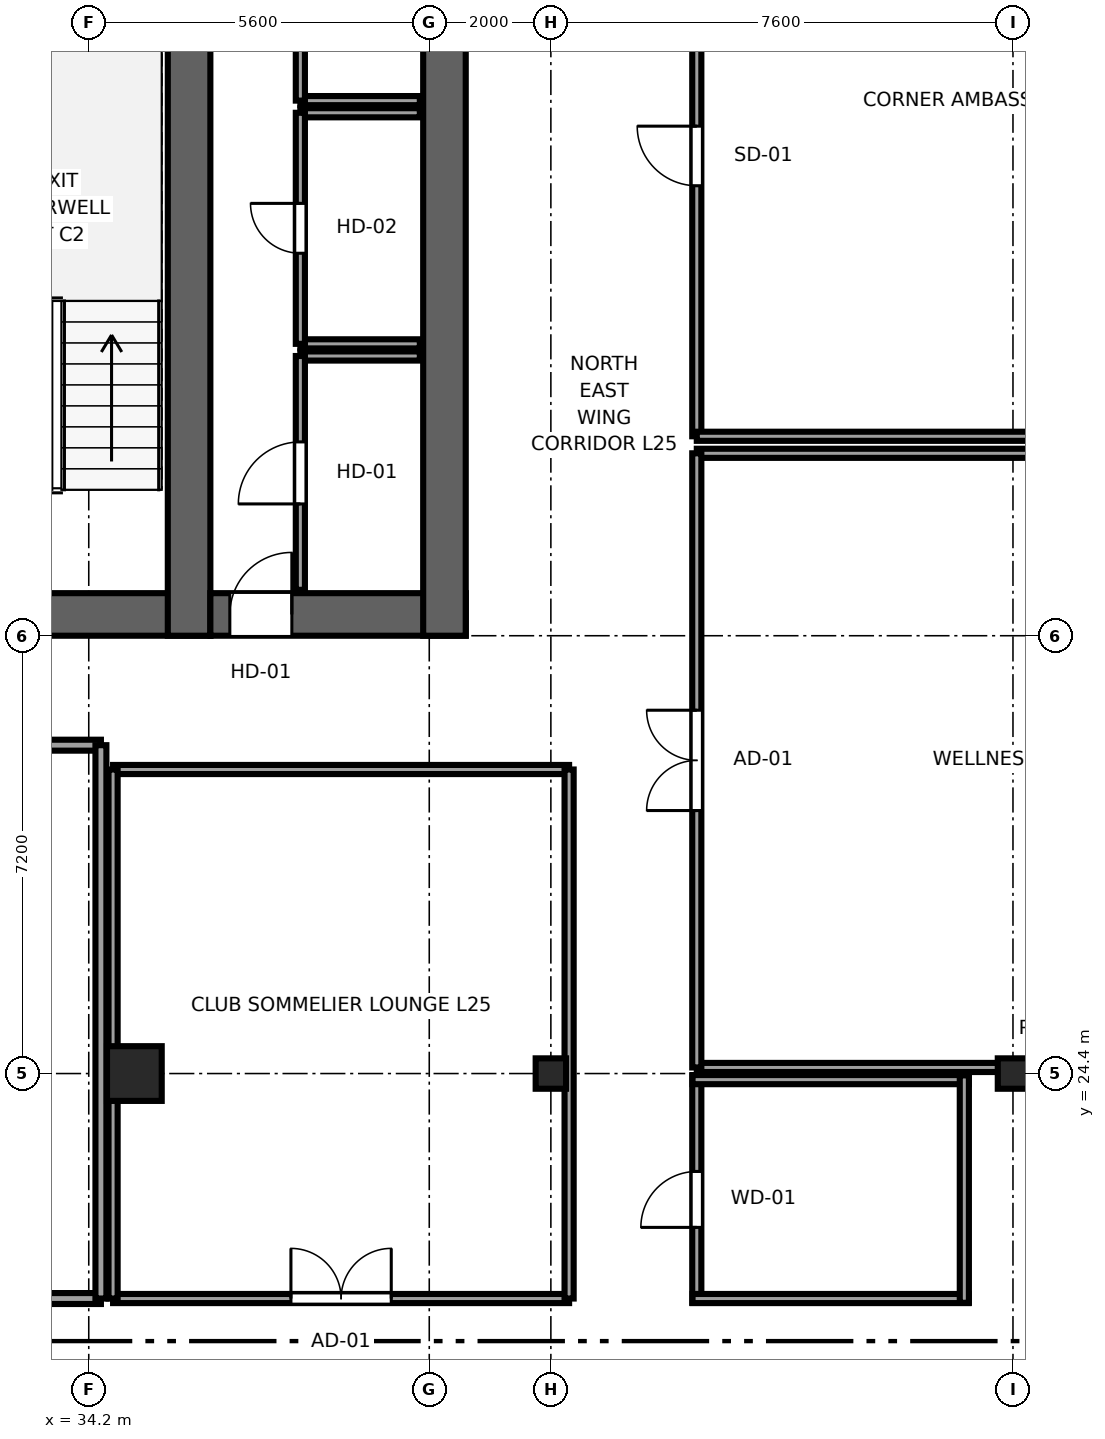
"""IFC4 building model, lengths in metres.
Left out: names, types, materials, properties, quantities, classifications, styles, units other than length and angle.
Written with IfcOpenShell. Run it as: python <this file> out.ifc"""

import sys

from ifc_helpers import new_model, si_unit, direction, frame, frame_2d, origin, origin_2d, place, context, subcontext, project, spatial, rectangle, i_section, extrude, source, transform, mapped, element, fill, save


model = new_model("IFC4")
c1 = context("Model", 3, precision=1e-05, world=origin(), true_north=direction((0.0, 1.0)))
c2 = subcontext(c1, "Body", "Model", "MODEL_VIEW")
j1 = project(units=[si_unit("LENGTHUNIT", "METRE"), si_unit("PLANEANGLEUNIT", "RADIAN")], contexts=[c1])
p1 = place(None, origin())
s1 = spatial("IfcSite", under=j1, at=p1, CompositionType="ELEMENT")
p2 = place(p1, origin())
s2 = spatial("IfcBuilding", under=s1, at=p2, CompositionType="ELEMENT")
p3 = place(p2, frame((0.0, 0.0, 100.9)))
s3 = spatial("IfcBuildingStorey", under=s2, at=p3, CompositionType="ELEMENT", Elevation=100.9)
p4 = place(p3, frame((9.8, 31.95, 0.0), z_axis=(0.0, 0.0, 1.0), x_axis=(1.0, 0.0, 0.0)))
e1 = element("IfcWall", 1, at=p4, inside=s3, PredefinedType="SHEAR", context=c2, shape_type="SweptSolid", body=[
    extrude(rectangle(XDim=26.4, YDim=0.7, at=frame_2d((13.2, 0.0))), origin(), (0.0, 0.0, 1.0), 3.55),
])
p5 = place(p4, frame((6.32, 0.0, 0.0), z_axis=(0.0, 0.0, 1.0), x_axis=(-1.0, 0.0, 0.0)))
e2 = element("IfcOpeningElement", 2, at=p5, cuts=e1, PredefinedType="OPENING", context=c2, shape_type="SweptSolid", body=[
    extrude(rectangle(XDim=1.5, YDim=2.04, at=frame_2d((0.75, 1.02))), frame((0.0, 0.36, 0.0), z_axis=(0.0, -1.0, 0.0), x_axis=(1.0, 0.0, 0.0)), (0.0, 0.0, 1.0), 0.72),
])
p6 = place(p4, frame((13.95, 0.0, 0.0), z_axis=(0.0, 0.0, 1.0), x_axis=(-1.0, 0.0, 0.0)))
e3 = element("IfcOpeningElement", 3, at=p6, cuts=e1, PredefinedType="OPENING", context=c2, shape_type="SweptSolid", body=[
    extrude(rectangle(XDim=1.5, YDim=2.04, at=frame_2d((0.75, 1.02))), frame((0.0, 0.36, 0.0), z_axis=(0.0, -1.0, 0.0), x_axis=(1.0, 0.0, 0.0)), (0.0, 0.0, 1.0), 0.72),
])
p7 = place(p4, frame((20.25, 0.0, 0.0), z_axis=(0.0, 0.0, 1.0), x_axis=(-1.0, 0.0, 0.0)))
e4 = element("IfcOpeningElement", 4, at=p7, cuts=e1, PredefinedType="OPENING", context=c2, shape_type="SweptSolid", body=[
    extrude(rectangle(XDim=1.5, YDim=2.04, at=frame_2d((0.75, 1.02))), frame((0.0, 0.36, 0.0), z_axis=(0.0, -1.0, 0.0), x_axis=(1.0, 0.0, 0.0)), (0.0, 0.0, 1.0), 0.72),
])
p8 = place(p4, frame((8.37, 0.0, 0.0), z_axis=(0.0, 0.0, 1.0), x_axis=(-1.0, 0.0, 0.0)))
e5 = element("IfcOpeningElement", 5, at=p8, cuts=e1, PredefinedType="OPENING", context=c2, shape_type="SweptSolid", body=[
    extrude(rectangle(XDim=0.82, YDim=2.01, at=frame_2d((0.41, 1.005))), frame((0.0, 0.36, 0.0), z_axis=(0.0, -1.0, 0.0), x_axis=(1.0, 0.0, 0.0)), (0.0, 0.0, 1.0), 0.72),
])
p9 = place(p3, frame((35.85, 31.6, 0.0), z_axis=(0.0, 0.0, 1.0), x_axis=(0.0, 1.0, 0.0)))
e6 = element("IfcWall", 6, at=p9, inside=s3, PredefinedType="SHEAR", context=c2, shape_type="SweptSolid", body=[
    extrude(rectangle(XDim=13.6, YDim=0.7, at=frame_2d((6.8, 0.0))), origin(), (0.0, 0.0, 1.0), 3.55),
])
p10 = place(p3, frame((36.2, 31.95, 0.0), z_axis=(0.0, 0.0, 1.0), x_axis=(1.0, 0.0, 0.0)))
e7 = element("IfcWall", 7, at=p10, inside=s3, PredefinedType="SHEAR", context=c2, shape_type="SweptSolid", body=[
    extrude(rectangle(XDim=4.2, YDim=0.7, at=frame_2d((2.1, 0.0))), origin(), (0.0, 0.0, 1.0), 3.55),
])
p11 = place(p10, frame((1.34, 0.0, 0.0), z_axis=(0.0, 0.0, 1.0), x_axis=(-1.0, 0.0, 0.0)))
e8 = element("IfcOpeningElement", 8, at=p11, cuts=e7, PredefinedType="OPENING", context=c2, shape_type="SweptSolid", body=[
    extrude(rectangle(XDim=1.02, YDim=2.03, at=frame_2d((0.51, 1.015))), frame((0.0, 0.36, 0.0), z_axis=(0.0, -1.0, 0.0), x_axis=(1.0, 0.0, 0.0)), (0.0, 0.0, 1.0), 0.72),
])
p12 = place(p3, frame((40.05, 31.6, 0.0), z_axis=(0.0, 0.0, 1.0), x_axis=(0.0, 1.0, 0.0)))
e9 = element("IfcWall", 9, at=p12, inside=s3, PredefinedType="SHEAR", context=c2, shape_type="SweptSolid", body=[
    extrude(rectangle(XDim=13.6, YDim=0.7, at=frame_2d((6.8, 0.0))), origin(), (0.0, 0.0, 1.0), 3.55),
])
m1 = source(origin(), c2, "Body", "SweptSolid", [
    extrude(rectangle(XDim=0.9, YDim=0.9, at=origin_2d()), origin(), (0.0, 0.0, 1.0), 3.55),
])
p13 = place(p3, frame((34.95, 24.4, 0.0), z_axis=(0.0, 0.0, 1.0), x_axis=(1.0, 0.0, 0.0)))
e10 = element("IfcColumn", 10, at=p13, inside=s3, PredefinedType="COLUMN", context=c2, shape_type="MappedRepresentation", body=[
    mapped(m1, transform((0.0, 0.0, 0.0), x_axis=(1.0, 0.0, 0.0), y_axis=(0.0, 1.0, 0.0), z_axis=(0.0, 0.0, 1.0), scale=1.0)),
])
m2 = source(origin(), c2, "Body", "SweptSolid", [
    extrude(i_section(OverallWidth=0.5, OverallDepth=0.5, WebThickness=0.022, FlangeThickness=0.034, at=origin_2d()), origin(), (0.0, 0.0, 1.0), 3.55),
])
for number, where, z_axis, x_axis in (
    (11, (41.8, 24.4, 0.0), (0.0, 0.0, 1.0), (1.0, 0.0, 0.0)),
    (12, (49.4, 24.4, 0.0), (0.0, 0.0, 1.0), (1.0, 0.0, 0.0)),
):
    element("IfcColumn", number, at=place(p3, frame(where, z_axis=z_axis, x_axis=x_axis)), inside=s3, PredefinedType="COLUMN", context=c2, shape_type="MappedRepresentation", body=[
        mapped(m2, transform((0.0, 0.0, 0.0), x_axis=(1.0, 0.0, 0.0), y_axis=(0.0, 1.0, 0.0), z_axis=(0.0, 0.0, 1.0), scale=1.0)),
    ])
p14 = place(p3, frame((37.68, 36.2, 0.0), z_axis=(0.0, 0.0, 1.0), x_axis=(1.0, 0.0, 0.0)))
e13 = element("IfcWall", 13, at=p14, inside=s3, PredefinedType="PARTITIONING", context=c2, shape_type="SweptSolid", body=[
    extrude(rectangle(XDim=1.965, YDim=0.15, at=frame_2d((0.982, 0.0))), origin(), (0.0, 0.0, 1.0), 3.37),
])
p15 = place(p3, frame((37.68, 32.355, 0.0), z_axis=(0.0, 0.0, 1.0), x_axis=(0.0, 1.0, 0.0)))
e14 = element("IfcWall", 14, at=p15, inside=s3, PredefinedType="PARTITIONING", context=c2, shape_type="SweptSolid", body=[
    extrude(rectangle(XDim=3.845, YDim=0.15, at=frame_2d((1.922, 0.0))), origin(), (0.0, 0.0, 1.0), 3.37),
])
p16 = place(p15, frame((1.413, 0.0, 0.0)))
e15 = element("IfcOpeningElement", 15, at=p16, cuts=e14, PredefinedType="OPENING", context=c2, shape_type="SweptSolid", body=[
    extrude(rectangle(XDim=1.02, YDim=2.03, at=frame_2d((0.51, 1.015))), frame((0.0, 0.085, 0.0), z_axis=(0.0, -1.0, 0.0), x_axis=(1.0, 0.0, 0.0)), (0.0, 0.0, 1.0), 0.17),
])
for number, where, z_axis, x_axis in (
    (16, (37.68, 36.4, 0.0), (0.0, 0.0, 1.0), (1.0, 0.0, 0.0)),
    (17, (37.68, 40.2, 0.0), (0.0, 0.0, 1.0), (1.0, 0.0, 0.0)),
):
    element("IfcWall", number, at=place(p3, frame(where, z_axis=z_axis, x_axis=x_axis)), inside=s3, PredefinedType="PARTITIONING", context=c2, shape_type="SweptSolid", body=[
        extrude(rectangle(XDim=1.965, YDim=0.15, at=frame_2d((0.982, 0.0))), origin(), (0.0, 0.0, 1.0), 3.37),
    ])
p17 = place(p3, frame((37.68, 36.4, 0.0), z_axis=(0.0, 0.0, 1.0), x_axis=(0.0, 1.0, 0.0)))
e18 = element("IfcWall", 18, at=p17, inside=s3, PredefinedType="PARTITIONING", context=c2, shape_type="SweptSolid", body=[
    extrude(rectangle(XDim=3.8, YDim=0.15, at=frame_2d((1.9, 0.0))), origin(), (0.0, 0.0, 1.0), 3.37),
])
p18 = place(p17, frame((1.49, 0.0, 0.0)))
e19 = element("IfcOpeningElement", 19, at=p18, cuts=e18, PredefinedType="OPENING", context=c2, shape_type="SweptSolid", body=[
    extrude(rectangle(XDim=0.82, YDim=2.01, at=frame_2d((0.41, 1.005))), frame((0.0, 0.085, 0.0), z_axis=(0.0, -1.0, 0.0), x_axis=(1.0, 0.0, 0.0)), (0.0, 0.0, 1.0), 0.17),
])
p19 = place(p3, frame((37.68, 40.4, 0.0), z_axis=(0.0, 0.0, 1.0), x_axis=(1.0, 0.0, 0.0)))
e20 = element("IfcWall", 20, at=p19, inside=s3, PredefinedType="PARTITIONING", context=c2, shape_type="SweptSolid", body=[
    extrude(rectangle(XDim=1.965, YDim=0.15, at=frame_2d((0.982, 0.0))), origin(), (0.0, 0.0, 1.0), 3.37),
])
p20 = place(p3, frame((37.68, 40.4, 0.0), z_axis=(0.0, 0.0, 1.0), x_axis=(0.0, 1.0, 0.0)))
e21 = element("IfcWall", 21, at=p20, inside=s3, PredefinedType="PARTITIONING", context=c2, shape_type="SweptSolid", body=[
    extrude(rectangle(XDim=3.8, YDim=0.15, at=frame_2d((1.9, 0.0))), origin(), (0.0, 0.0, 1.0), 3.37),
])
p21 = place(p20, frame((1.49, 0.0, 0.0)))
e22 = element("IfcOpeningElement", 22, at=p21, cuts=e21, PredefinedType="OPENING", context=c2, shape_type="SweptSolid", body=[
    extrude(rectangle(XDim=0.82, YDim=2.01, at=frame_2d((0.41, 1.005))), frame((0.0, 0.085, 0.0), z_axis=(0.0, -1.0, 0.0), x_axis=(1.0, 0.0, 0.0)), (0.0, 0.0, 1.0), 0.17),
])
p22 = place(p3, frame((44.2, 20.63, 0.0), z_axis=(0.0, 0.0, 1.0), x_axis=(0.0, 1.0, 0.0)))
e23 = element("IfcWall", 23, at=p22, inside=s3, PredefinedType="PARTITIONING", context=c2, shape_type="SweptSolid", body=[
    extrude(rectangle(XDim=3.74, YDim=0.15, at=frame_2d((1.87, 0.0))), origin(), (0.0, 0.0, 1.0), 3.37),
])
p23 = place(p22, frame((1.24, 0.0, 0.0)))
e24 = element("IfcOpeningElement", 24, at=p23, cuts=e23, PredefinedType="OPENING", context=c2, shape_type="SweptSolid", body=[
    extrude(rectangle(XDim=0.92, YDim=2.01, at=frame_2d((0.46, 1.005))), frame((0.0, 0.085, 0.0), z_axis=(0.0, -1.0, 0.0), x_axis=(1.0, 0.0, 0.0)), (0.0, 0.0, 1.0), 0.17),
])
p24 = place(p3, frame((44.13, 20.7, 0.0), z_axis=(0.0, 0.0, 1.0), x_axis=(1.0, 0.0, 0.0)))
e25 = element("IfcWall", 25, at=p24, inside=s3, PredefinedType="PARTITIONING", context=c2, shape_type="SweptSolid", body=[
    extrude(rectangle(XDim=4.54, YDim=0.15, at=frame_2d((2.27, 0.0))), origin(), (0.0, 0.0, 1.0), 3.37),
])
p25 = place(p3, frame((44.13, 24.3, 0.0), z_axis=(0.0, 0.0, 1.0), x_axis=(1.0, 0.0, 0.0)))
e26 = element("IfcWall", 26, at=p25, inside=s3, PredefinedType="PARTITIONING", context=c2, shape_type="SweptSolid", body=[
    extrude(rectangle(XDim=4.54, YDim=0.15, at=frame_2d((2.27, 0.0))), origin(), (0.0, 0.0, 1.0), 2.748),
])
p26 = place(p3, frame((48.6, 20.63, 0.0), z_axis=(0.0, 0.0, 1.0), x_axis=(0.0, 1.0, 0.0)))
e27 = element("IfcWall", 27, at=p26, inside=s3, PredefinedType="PARTITIONING", context=c2, shape_type="SweptSolid", body=[
    extrude(rectangle(XDim=3.74, YDim=0.15, at=frame_2d((1.87, 0.0))), origin(), (0.0, 0.0, 1.0), 3.37),
])
p27 = place(p3, frame((44.2, 24.5, 0.0), z_axis=(0.0, 0.0, 1.0), x_axis=(1.0, 0.0, 0.0)))
e28 = element("IfcWall", 28, at=p27, inside=s3, PredefinedType="PARTITIONING", context=c2, shape_type="SweptSolid", body=[
    extrude(rectangle(XDim=12.395, YDim=0.15, at=frame_2d((6.198, 0.0))), origin(), (0.0, 0.0, 1.0), 2.748),
])
p28 = place(p3, frame((44.2, 34.6, 0.0), z_axis=(0.0, 0.0, 1.0), x_axis=(1.0, 0.0, 0.0)))
e29 = element("IfcWall", 29, at=p28, inside=s3, PredefinedType="PARTITIONING", context=c2, shape_type="SweptSolid", body=[
    extrude(rectangle(XDim=12.395, YDim=0.15, at=frame_2d((6.198, 0.0))), origin(), (0.0, 0.0, 1.0), 3.37),
])
p29 = place(p3, frame((44.2, 24.5, 0.0), z_axis=(0.0, 0.0, 1.0), x_axis=(0.0, 1.0, 0.0)))
e30 = element("IfcWall", 30, at=p29, inside=s3, PredefinedType="PARTITIONING", context=c2, shape_type="SweptSolid", body=[
    extrude(rectangle(XDim=10.1, YDim=0.15, at=frame_2d((5.05, 0.0))), origin(), (0.0, 0.0, 1.0), 3.37),
])
p30 = place(p29, frame((4.225, 0.0, 0.0)))
e31 = element("IfcOpeningElement", 31, at=p30, cuts=e30, PredefinedType="OPENING", context=c2, shape_type="SweptSolid", body=[
    extrude(rectangle(XDim=1.65, YDim=2.15, at=frame_2d((0.825, 1.075))), frame((0.0, 0.085, 0.0), z_axis=(0.0, -1.0, 0.0), x_axis=(1.0, 0.0, 0.0)), (0.0, 0.0, 1.0), 0.17),
])
p31 = place(p3, frame((44.2, 34.88, 0.0), z_axis=(0.0, 0.0, 1.0), x_axis=(0.0, 1.0, 0.0)))
e32 = element("IfcWall", 32, at=p31, inside=s3, PredefinedType="PARTITIONING", context=c2, shape_type="SweptSolid", body=[
    extrude(rectangle(XDim=9.33, YDim=0.15, at=frame_2d((4.665, 0.0))), origin(), (0.0, 0.0, 1.0), 3.37),
])
p32 = place(p31, frame((4.12, 0.0, 0.0)))
e33 = element("IfcOpeningElement", 33, at=p32, cuts=e32, PredefinedType="OPENING", context=c2, shape_type="SweptSolid", body=[
    extrude(rectangle(XDim=0.98, YDim=2.12, at=frame_2d((0.49, 1.06))), frame((0.0, 0.085, 0.0), z_axis=(0.0, -1.0, 0.0), x_axis=(1.0, 0.0, 0.0)), (0.0, 0.0, 1.0), 0.17),
])
p33 = place(p3, frame((44.2, 34.88, 0.0), z_axis=(0.0, 0.0, 1.0), x_axis=(1.0, 0.0, 0.0)))
e34 = element("IfcWall", 34, at=p33, inside=s3, PredefinedType="PARTITIONING", context=c2, shape_type="SweptSolid", body=[
    extrude(rectangle(XDim=10.03, YDim=0.15, at=frame_2d((5.015, 0.0))), origin(), (0.0, 0.0, 1.0), 3.37),
])
p34 = place(p3, frame((27.1, 20.7, 0.0), z_axis=(0.0, 0.0, 1.0), x_axis=(1.0, 0.0, 0.0)))
e35 = element("IfcWall", 35, at=p34, inside=s3, PredefinedType="PARTITIONING", context=c2, shape_type="SweptSolid", body=[
    extrude(rectangle(XDim=7.3, YDim=0.18, at=frame_2d((3.65, 0.0))), origin(), (0.0, 0.0, 1.0), 3.37),
])
p35 = place(p34, frame((2.825, 0.0, 0.0)))
e36 = element("IfcOpeningElement", 36, at=p35, cuts=e35, PredefinedType="OPENING", context=c2, shape_type="SweptSolid", body=[
    extrude(rectangle(XDim=1.65, YDim=2.15, at=frame_2d((0.825, 1.075))), frame((0.0, 0.1, 0.0), z_axis=(0.0, -1.0, 0.0), x_axis=(1.0, 0.0, 0.0)), (0.0, 0.0, 1.0), 0.2),
])
p36 = place(p3, frame((27.1, 29.8, 0.0), z_axis=(0.0, 0.0, 1.0), x_axis=(1.0, 0.0, 0.0)))
e37 = element("IfcWall", 37, at=p36, inside=s3, PredefinedType="PARTITIONING", context=c2, shape_type="SweptSolid", body=[
    extrude(rectangle(XDim=7.3, YDim=0.18, at=frame_2d((3.65, 0.0))), origin(), (0.0, 0.0, 1.0), 3.37),
])
p37 = place(p3, frame((34.4, 20.7, 0.0), z_axis=(0.0, 0.0, 1.0), x_axis=(0.0, 1.0, 0.0)))
e38 = element("IfcWall", 38, at=p37, inside=s3, PredefinedType="PARTITIONING", context=c2, shape_type="SweptSolid", body=[
    extrude(rectangle(XDim=9.1, YDim=0.18, at=frame_2d((4.55, 0.0))), origin(), (0.0, 0.0, 1.0), 3.37),
])
p38 = place(p3, frame((34.6, 20.7, 0.0), z_axis=(0.0, 0.0, 1.0), x_axis=(1.0, 0.0, 0.0)))
e39 = element("IfcWall", 39, at=p38, inside=s3, PredefinedType="PARTITIONING", context=c2, shape_type="SweptSolid", body=[
    extrude(rectangle(XDim=7.5, YDim=0.15, at=frame_2d((3.75, 0.0))), origin(), (0.0, 0.0, 1.0), 3.37),
])
p39 = place(p38, frame((2.925, 0.0, 0.0)))
e40 = element("IfcOpeningElement", 40, at=p39, cuts=e39, PredefinedType="OPENING", context=c2, shape_type="SweptSolid", body=[
    extrude(rectangle(XDim=1.65, YDim=2.15, at=frame_2d((0.825, 1.075))), frame((0.0, 0.085, 0.0), z_axis=(0.0, -1.0, 0.0), x_axis=(1.0, 0.0, 0.0)), (0.0, 0.0, 1.0), 0.17),
])
p40 = place(p3, frame((34.6, 29.4, 0.0), z_axis=(0.0, 0.0, 1.0), x_axis=(1.0, 0.0, 0.0)))
e41 = element("IfcWall", 41, at=p40, inside=s3, PredefinedType="PARTITIONING", context=c2, shape_type="SweptSolid", body=[
    extrude(rectangle(XDim=7.5, YDim=0.15, at=frame_2d((3.75, 0.0))), origin(), (0.0, 0.0, 1.0), 3.37),
])
p41 = place(p3, frame((34.6, 20.7, 0.0), z_axis=(0.0, 0.0, 1.0), x_axis=(0.0, 1.0, 0.0)))
e42 = element("IfcWall", 42, at=p41, inside=s3, PredefinedType="PARTITIONING", context=c2, shape_type="SweptSolid", body=[
    extrude(rectangle(XDim=8.7, YDim=0.15, at=frame_2d((4.35, 0.0))), origin(), (0.0, 0.0, 1.0), 3.37),
])
p42 = place(p3, frame((42.1, 20.7, 0.0), z_axis=(0.0, 0.0, 1.0), x_axis=(0.0, 1.0, 0.0)))
e43 = element("IfcWall", 43, at=p42, inside=s3, PredefinedType="PARTITIONING", context=c2, shape_type="SweptSolid", body=[
    extrude(rectangle(XDim=8.7, YDim=0.15, at=frame_2d((4.35, 0.0))), origin(), (0.0, 0.0, 1.0), 2.16),
])
m3 = source(origin(), c2, "Body", "SweptSolid", [
    extrude(rectangle(XDim=1.02, YDim=2.03, at=frame_2d((0.51, 1.015))), frame((0.0, 0.025, 0.0), z_axis=(0.0, -1.0, 0.0), x_axis=(1.0, 0.0, 0.0)), (0.0, 0.0, 1.0), 0.05),
])
p43 = place(p11, origin())
e44 = element("IfcDoor", 44, at=p43, inside=s3, OperationType="SINGLE_SWING_RIGHT", PredefinedType="DOOR", context=c2, shape_type="MappedRepresentation", body=[
    mapped(m3, transform((0.0, 0.0, 0.0), x_axis=(1.0, 0.0, 0.0), y_axis=(0.0, 1.0, 0.0), z_axis=(0.0, 0.0, 1.0), scale=1.0)),
])
fill(e8, e44)
p44 = place(p16, origin())
e45 = element("IfcDoor", 45, at=p44, inside=s3, OperationType="SINGLE_SWING_LEFT", PredefinedType="DOOR", context=c2, shape_type="MappedRepresentation", body=[
    mapped(m3, transform((0.0, 0.0, 0.0), x_axis=(1.0, 0.0, 0.0), y_axis=(0.0, 1.0, 0.0), z_axis=(0.0, 0.0, 1.0), scale=1.0)),
])
fill(e15, e45)
m4 = source(origin(), c2, "Body", "SweptSolid", [
    extrude(rectangle(XDim=0.82, YDim=2.01, at=frame_2d((0.41, 1.005))), frame((0.0, 0.025, 0.0), z_axis=(0.0, -1.0, 0.0), x_axis=(1.0, 0.0, 0.0)), (0.0, 0.0, 1.0), 0.05),
])
p45 = place(p18, origin())
e46 = element("IfcDoor", 46, at=p45, inside=s3, OperationType="SINGLE_SWING_RIGHT", PredefinedType="DOOR", context=c2, shape_type="MappedRepresentation", body=[
    mapped(m4, transform((0.0, 0.0, 0.0), x_axis=(1.0, 0.0, 0.0), y_axis=(0.0, 1.0, 0.0), z_axis=(0.0, 0.0, 1.0), scale=1.0)),
])
fill(e19, e46)
m5 = source(origin(), c2, "Body", "SweptSolid", [
    extrude(rectangle(XDim=0.92, YDim=2.01, at=frame_2d((0.46, 1.005))), frame((0.0, 0.025, 0.0), z_axis=(0.0, -1.0, 0.0), x_axis=(1.0, 0.0, 0.0)), (0.0, 0.0, 1.0), 0.05),
])
p46 = place(p23, origin())
e47 = element("IfcDoor", 47, at=p46, inside=s3, OperationType="SINGLE_SWING_LEFT", PredefinedType="DOOR", context=c2, shape_type="MappedRepresentation", body=[
    mapped(m5, transform((0.0, 0.0, 0.0), x_axis=(1.0, 0.0, 0.0), y_axis=(0.0, 1.0, 0.0), z_axis=(0.0, 0.0, 1.0), scale=1.0)),
])
fill(e24, e47)
m6 = source(origin(), c2, "Body", "SweptSolid", [
    extrude(rectangle(XDim=1.65, YDim=2.15, at=frame_2d((0.825, 1.075))), frame((0.0, 0.025, 0.0), z_axis=(0.0, -1.0, 0.0), x_axis=(1.0, 0.0, 0.0)), (0.0, 0.0, 1.0), 0.05),
])
p47 = place(p30, origin())
e48 = element("IfcDoor", 48, at=p47, inside=s3, OperationType="DOUBLE_DOOR_SINGLE_SWING", PredefinedType="DOOR", context=c2, shape_type="MappedRepresentation", body=[
    mapped(m6, transform((0.0, 0.0, 0.0), x_axis=(1.0, 0.0, 0.0), y_axis=(0.0, 1.0, 0.0), z_axis=(0.0, 0.0, 1.0), scale=1.0)),
])
fill(e31, e48)
m7 = source(origin(), c2, "Body", "SweptSolid", [
    extrude(rectangle(XDim=0.98, YDim=2.12, at=frame_2d((0.49, 1.06))), frame((0.0, 0.025, 0.0), z_axis=(0.0, -1.0, 0.0), x_axis=(1.0, 0.0, 0.0)), (0.0, 0.0, 1.0), 0.05),
])
p48 = place(p32, origin())
e49 = element("IfcDoor", 49, at=p48, inside=s3, OperationType="SINGLE_SWING_RIGHT", PredefinedType="DOOR", context=c2, shape_type="MappedRepresentation", body=[
    mapped(m7, transform((0.0, 0.0, 0.0), x_axis=(1.0, 0.0, 0.0), y_axis=(0.0, 1.0, 0.0), z_axis=(0.0, 0.0, 1.0), scale=1.0)),
])
fill(e33, e49)
p49 = place(p39, origin())
e50 = element("IfcDoor", 50, at=p49, inside=s3, OperationType="DOUBLE_DOOR_SINGLE_SWING", PredefinedType="DOOR", context=c2, shape_type="MappedRepresentation", body=[
    mapped(m6, transform((0.0, 0.0, 0.0), x_axis=(1.0, 0.0, 0.0), y_axis=(0.0, 1.0, 0.0), z_axis=(0.0, 0.0, 1.0), scale=1.0)),
])
fill(e40, e50)
save(model, sys.argv[1])
